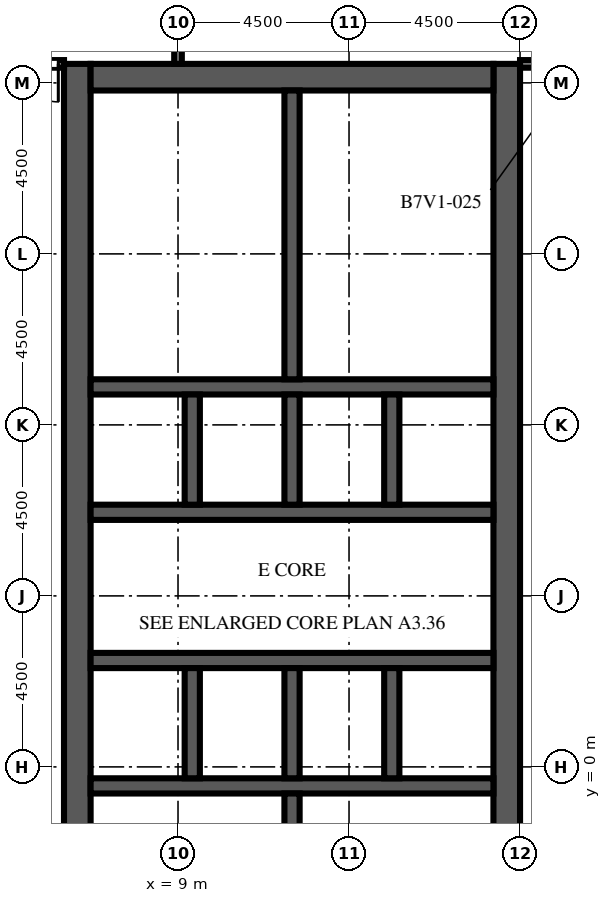
"""IFC4 building model, lengths in metres.
Left out: names, types, materials, properties, quantities, classifications, styles, units other than length and angle.
Written with IfcOpenShell. Run it as: python <this file> out.ifc"""

import sys

from ifc_helpers import new_model, si_unit, direction, frame, frame_2d, origin, place, context, subcontext, project, spatial, rectangle, extrude, element, fill, save


model = new_model("IFC4")
c1 = context("Model", 3, precision=1e-05, world=origin(), true_north=direction((0.0, 1.0)))
c2 = subcontext(c1, "Body", "Model", "MODEL_VIEW")
j1 = project(units=[si_unit("LENGTHUNIT", "METRE"), si_unit("PLANEANGLEUNIT", "RADIAN")], contexts=[c1])
p1 = place(None, origin())
s1 = spatial("IfcSite", under=j1, at=p1, CompositionType="ELEMENT")
p2 = place(p1, origin())
s2 = spatial("IfcBuilding", under=s1, at=p2, CompositionType="ELEMENT")
p3 = place(p2, frame((0.0, 0.0, 243.9)))
s3 = spatial("IfcBuildingStorey", under=s2, at=p3, CompositionType="ELEMENT", Elevation=243.9)
p4 = place(p3, frame((6.35, -9.0, 0.0), z_axis=(0.0, 0.0, 1.0), x_axis=(0.0, 1.0, 0.0)))
e1 = element("IfcWall", 1, at=p4, inside=s3, PredefinedType="SHEAR", context=c2, shape_type="SweptSolid", body=[
    extrude(rectangle(XDim=27.5, YDim=0.7, at=frame_2d((13.75, 0.0))), origin(), (0.0, 0.0, 1.0), 4.1),
])
p5 = place(p4, frame((12.55, 0.0, 0.0)))
e2 = element("IfcOpeningElement", 2, at=p5, cuts=e1, PredefinedType="OPENING", context=c2, shape_type="SweptSolid", body=[
    extrude(rectangle(XDim=2.4, YDim=2.4, at=frame_2d((1.2, 1.2))), frame((0.0, 0.36, 0.0), z_axis=(0.0, -1.0, 0.0), x_axis=(1.0, 0.0, 0.0)), (0.0, 0.0, 1.0), 0.72),
])
p6 = place(p4, frame((3.9, 0.0, 0.0)))
e3 = element("IfcOpeningElement", 3, at=p6, cuts=e1, PredefinedType="OPENING", context=c2, shape_type="SweptSolid", body=[
    extrude(rectangle(XDim=1.2, YDim=2.1, at=frame_2d((0.6, 1.05))), frame((0.0, 0.36, 0.0), z_axis=(0.0, -1.0, 0.0), x_axis=(1.0, 0.0, 0.0)), (0.0, 0.0, 1.0), 0.72),
])
p7 = place(p4, frame((22.4, 0.0, 0.0)))
e4 = element("IfcOpeningElement", 4, at=p7, cuts=e1, PredefinedType="OPENING", context=c2, shape_type="SweptSolid", body=[
    extrude(rectangle(XDim=1.2, YDim=2.1, at=frame_2d((0.6, 1.05))), frame((0.0, 0.36, 0.0), z_axis=(0.0, -1.0, 0.0), x_axis=(1.0, 0.0, 0.0)), (0.0, 0.0, 1.0), 0.72),
])
p8 = place(p3, frame((17.65, -9.0, 0.0), z_axis=(0.0, 0.0, 1.0), x_axis=(0.0, 1.0, 0.0)))
e5 = element("IfcWall", 5, at=p8, inside=s3, PredefinedType="SHEAR", context=c2, shape_type="SweptSolid", body=[
    extrude(rectangle(XDim=27.5, YDim=0.7, at=frame_2d((13.75, 0.0))), origin(), (0.0, 0.0, 1.0), 4.1),
])
p9 = place(p8, frame((12.55, 0.0, 0.0)))
e6 = element("IfcOpeningElement", 6, at=p9, cuts=e5, PredefinedType="OPENING", context=c2, shape_type="SweptSolid", body=[
    extrude(rectangle(XDim=2.4, YDim=2.4, at=frame_2d((1.2, 1.2))), frame((0.0, 0.36, 0.0), z_axis=(0.0, -1.0, 0.0), x_axis=(1.0, 0.0, 0.0)), (0.0, 0.0, 1.0), 0.72),
])
p10 = place(p8, frame((6.825, 0.0, 0.0)))
e7 = element("IfcOpeningElement", 7, at=p10, cuts=e5, PredefinedType="OPENING", context=c2, shape_type="SweptSolid", body=[
    extrude(rectangle(XDim=1.2, YDim=2.1, at=frame_2d((0.6, 1.05))), frame((0.0, 0.36, 0.0), z_axis=(0.0, -1.0, 0.0), x_axis=(1.0, 0.0, 0.0)), (0.0, 0.0, 1.0), 0.72),
])
p11 = place(p8, frame((19.475, 0.0, 0.0)))
e8 = element("IfcOpeningElement", 8, at=p11, cuts=e5, PredefinedType="OPENING", context=c2, shape_type="SweptSolid", body=[
    extrude(rectangle(XDim=1.2, YDim=2.1, at=frame_2d((0.6, 1.05))), frame((0.0, 0.36, 0.0), z_axis=(0.0, -1.0, 0.0), x_axis=(1.0, 0.0, 0.0)), (0.0, 0.0, 1.0), 0.72),
])
p12 = place(p3, frame((6.7, 18.15, 0.0), z_axis=(0.0, 0.0, 1.0), x_axis=(1.0, 0.0, 0.0)))
e9 = element("IfcWall", 9, at=p12, inside=s3, PredefinedType="SHEAR", context=c2, shape_type="SweptSolid", body=[
    extrude(rectangle(XDim=10.6, YDim=0.7, at=frame_2d((5.3, 0.0))), origin(), (0.0, 0.0, 1.0), 4.1),
])
p13 = place(p3, frame((6.7, -0.5, 0.0), z_axis=(0.0, 0.0, 1.0), x_axis=(1.0, 0.0, 0.0)))
e10 = element("IfcWall", 10, at=p13, inside=s3, PredefinedType="SHEAR", context=c2, shape_type="SweptSolid", body=[
    extrude(rectangle(XDim=10.6, YDim=0.4, at=frame_2d((5.3, 0.0))), origin(), (0.0, 0.0, 1.0), 4.1),
])
p14 = place(p3, frame((6.7, 2.8, 0.0), z_axis=(0.0, 0.0, 1.0), x_axis=(1.0, 0.0, 0.0)))
e11 = element("IfcWall", 11, at=p14, inside=s3, PredefinedType="SHEAR", context=c2, shape_type="SweptSolid", body=[
    extrude(rectangle(XDim=10.6, YDim=0.4, at=frame_2d((5.3, 0.0))), origin(), (0.0, 0.0, 1.0), 4.1),
])
p15 = place(p14, frame((0.688, 0.0, 0.0)))
e12 = element("IfcOpeningElement", 12, at=p15, cuts=e11, PredefinedType="OPENING", context=c2, shape_type="SweptSolid", body=[
    extrude(rectangle(XDim=1.1, YDim=2.1, at=frame_2d((0.55, 1.05))), frame((0.0, 0.21, 0.0), z_axis=(0.0, -1.0, 0.0), x_axis=(1.0, 0.0, 0.0)), (0.0, 0.0, 1.0), 0.42),
])
p16 = place(p14, frame((3.438, 0.0, 0.0)))
e13 = element("IfcOpeningElement", 13, at=p16, cuts=e11, PredefinedType="OPENING", context=c2, shape_type="SweptSolid", body=[
    extrude(rectangle(XDim=1.1, YDim=2.1, at=frame_2d((0.55, 1.05))), frame((0.0, 0.21, 0.0), z_axis=(0.0, -1.0, 0.0), x_axis=(1.0, 0.0, 0.0)), (0.0, 0.0, 1.0), 0.42),
])
p17 = place(p14, frame((6.113, 0.0, 0.0)))
e14 = element("IfcOpeningElement", 14, at=p17, cuts=e11, PredefinedType="OPENING", context=c2, shape_type="SweptSolid", body=[
    extrude(rectangle(XDim=1.0, YDim=2.1, at=frame_2d((0.5, 1.05))), frame((0.0, 0.21, 0.0), z_axis=(0.0, -1.0, 0.0), x_axis=(1.0, 0.0, 0.0)), (0.0, 0.0, 1.0), 0.42),
])
p18 = place(p14, frame((8.863, 0.0, 0.0)))
e15 = element("IfcOpeningElement", 15, at=p18, cuts=e11, PredefinedType="OPENING", context=c2, shape_type="SweptSolid", body=[
    extrude(rectangle(XDim=1.0, YDim=2.1, at=frame_2d((0.5, 1.05))), frame((0.0, 0.21, 0.0), z_axis=(0.0, -1.0, 0.0), x_axis=(1.0, 0.0, 0.0)), (0.0, 0.0, 1.0), 0.42),
])
p19 = place(p3, frame((6.7, 6.7, 0.0), z_axis=(0.0, 0.0, 1.0), x_axis=(1.0, 0.0, 0.0)))
e16 = element("IfcWall", 16, at=p19, inside=s3, PredefinedType="SHEAR", context=c2, shape_type="SweptSolid", body=[
    extrude(rectangle(XDim=10.6, YDim=0.4, at=frame_2d((5.3, 0.0))), origin(), (0.0, 0.0, 1.0), 4.1),
])
p20 = place(p19, frame((3.438, 0.0, 0.0)))
e17 = element("IfcOpeningElement", 17, at=p20, cuts=e16, PredefinedType="OPENING", context=c2, shape_type="SweptSolid", body=[
    extrude(rectangle(XDim=1.1, YDim=2.1, at=frame_2d((0.55, 1.05))), frame((0.0, 0.21, 0.0), z_axis=(0.0, -1.0, 0.0), x_axis=(1.0, 0.0, 0.0)), (0.0, 0.0, 1.0), 0.42),
])
p21 = place(p19, frame((6.062, 0.0, 0.0)))
e18 = element("IfcOpeningElement", 18, at=p21, cuts=e16, PredefinedType="OPENING", context=c2, shape_type="SweptSolid", body=[
    extrude(rectangle(XDim=1.1, YDim=2.1, at=frame_2d((0.55, 1.05))), frame((0.0, 0.21, 0.0), z_axis=(0.0, -1.0, 0.0), x_axis=(1.0, 0.0, 0.0)), (0.0, 0.0, 1.0), 0.42),
])
p22 = place(p19, frame((8.812, 0.0, 0.0)))
e19 = element("IfcOpeningElement", 19, at=p22, cuts=e16, PredefinedType="OPENING", context=c2, shape_type="SweptSolid", body=[
    extrude(rectangle(XDim=1.1, YDim=2.1, at=frame_2d((0.55, 1.05))), frame((0.0, 0.21, 0.0), z_axis=(0.0, -1.0, 0.0), x_axis=(1.0, 0.0, 0.0)), (0.0, 0.0, 1.0), 0.42),
])
p23 = place(p19, frame((0.738, 0.0, 0.0)))
e20 = element("IfcOpeningElement", 20, at=p23, cuts=e16, PredefinedType="OPENING", context=c2, shape_type="SweptSolid", body=[
    extrude(rectangle(XDim=1.0, YDim=2.1, at=frame_2d((0.5, 1.05))), frame((0.0, 0.21, 0.0), z_axis=(0.0, -1.0, 0.0), x_axis=(1.0, 0.0, 0.0)), (0.0, 0.0, 1.0), 0.42),
])
p24 = place(p3, frame((6.7, 10.0, 0.0), z_axis=(0.0, 0.0, 1.0), x_axis=(1.0, 0.0, 0.0)))
e21 = element("IfcWall", 21, at=p24, inside=s3, PredefinedType="SHEAR", context=c2, shape_type="SweptSolid", body=[
    extrude(rectangle(XDim=10.6, YDim=0.4, at=frame_2d((5.3, 0.0))), origin(), (0.0, 0.0, 1.0), 4.1),
])
for number, where, z_axis, x_axis in (
    (22, (9.375, -0.3, 0.0), (0.0, 0.0, 1.0), (0.0, 1.0, 0.0)),
    (23, (9.375, 6.9, 0.0), (0.0, 0.0, 1.0), (0.0, 1.0, 0.0)),
    (24, (12.0, -0.3, 0.0), (0.0, 0.0, 1.0), (0.0, 1.0, 0.0)),
    (25, (12.0, 6.9, 0.0), (0.0, 0.0, 1.0), (0.0, 1.0, 0.0)),
    (26, (14.625, -0.3, 0.0), (0.0, 0.0, 1.0), (0.0, 1.0, 0.0)),
    (27, (14.625, 6.9, 0.0), (0.0, 0.0, 1.0), (0.0, 1.0, 0.0)),
):
    element("IfcWall", number, at=place(p3, frame(where, z_axis=z_axis, x_axis=x_axis)), inside=s3, PredefinedType="SHEAR", context=c2, shape_type="SweptSolid", body=[
        extrude(rectangle(XDim=2.9, YDim=0.4, at=frame_2d((1.45, 0.0))), origin(), (0.0, 0.0, 1.0), 4.1),
    ])
for number, where, z_axis, x_axis in (
    (28, (12.0, -8.3, 0.0), (0.0, 0.0, 1.0), (0.0, 1.0, 0.0)),
    (29, (12.0, 10.2, 0.0), (0.0, 0.0, 1.0), (0.0, 1.0, 0.0)),
):
    element("IfcWall", number, at=place(p3, frame(where, z_axis=z_axis, x_axis=x_axis)), inside=s3, PredefinedType="SHEAR", context=c2, shape_type="SweptSolid", body=[
        extrude(rectangle(XDim=7.6, YDim=0.4, at=frame_2d((3.8, 0.0))), origin(), (0.0, 0.0, 1.0), 4.1),
    ])
p25 = place(p3, frame((8.2, -3.588, 0.0), z_axis=(0.0, 0.0, 1.0), x_axis=(0.0, 1.0, 0.0)))
e30 = element("IfcWall", 30, at=p25, inside=s3, PredefinedType="PARTITIONING", context=c2, shape_type="SweptSolid", body=[
    extrude(rectangle(XDim=2.888, YDim=0.1, at=frame_2d((1.444, 0.0))), origin(), (0.0, 0.0, 1.0), 3.65),
])
p26 = place(p25, frame((0.944, 0.0, 0.0)))
e31 = element("IfcOpeningElement", 31, at=p26, cuts=e30, PredefinedType="OPENING", context=c2, shape_type="SweptSolid", body=[
    extrude(rectangle(XDim=1.0, YDim=2.1, at=frame_2d((0.5, 1.05))), frame((0.0, 0.06, 0.0), z_axis=(0.0, -1.0, 0.0), x_axis=(1.0, 0.0, 0.0)), (0.0, 0.0, 1.0), 0.12),
])
p27 = place(p3, frame((8.1, 10.2, 0.0), z_axis=(0.0, 0.0, 1.0), x_axis=(0.0, 1.0, 0.0)))
e32 = element("IfcWall", 32, at=p27, inside=s3, PredefinedType="PARTITIONING", context=c2, shape_type="SweptSolid", body=[
    extrude(rectangle(XDim=2.28, YDim=0.1, at=frame_2d((1.14, 0.0))), origin(), (0.0, 0.0, 1.0), 3.65),
])
p28 = place(p27, frame((0.64, 0.0, 0.0)))
e33 = element("IfcOpeningElement", 33, at=p28, cuts=e32, PredefinedType="OPENING", context=c2, shape_type="SweptSolid", body=[
    extrude(rectangle(XDim=1.0, YDim=2.1, at=frame_2d((0.5, 1.05))), frame((0.0, 0.06, 0.0), z_axis=(0.0, -1.0, 0.0), x_axis=(1.0, 0.0, 0.0)), (0.0, 0.0, 1.0), 0.12),
])
p29 = place(p3, frame((8.1, 12.48, 0.0), z_axis=(0.0, 0.0, 1.0), x_axis=(0.0, 1.0, 0.0)))
e34 = element("IfcWall", 34, at=p29, inside=s3, PredefinedType="PARTITIONING", context=c2, shape_type="SweptSolid", body=[
    extrude(rectangle(XDim=2.432, YDim=0.1, at=frame_2d((1.216, 0.0))), origin(), (0.0, 0.0, 1.0), 3.65),
])
p30 = place(p29, frame((0.716, 0.0, 0.0)))
e35 = element("IfcOpeningElement", 35, at=p30, cuts=e34, PredefinedType="OPENING", context=c2, shape_type="SweptSolid", body=[
    extrude(rectangle(XDim=1.0, YDim=2.1, at=frame_2d((0.5, 1.05))), frame((0.0, 0.06, 0.0), z_axis=(0.0, -1.0, 0.0), x_axis=(1.0, 0.0, 0.0)), (0.0, 0.0, 1.0), 0.12),
])
p31 = place(p3, frame((8.1, 14.912, 0.0), z_axis=(0.0, 0.0, 1.0), x_axis=(0.0, 1.0, 0.0)))
e36 = element("IfcWall", 36, at=p31, inside=s3, PredefinedType="PARTITIONING", context=c2, shape_type="SweptSolid", body=[
    extrude(rectangle(XDim=2.888, YDim=0.1, at=frame_2d((1.444, 0.0))), origin(), (0.0, 0.0, 1.0), 3.65),
])
p32 = place(p31, frame((0.944, 0.0, 0.0)))
e37 = element("IfcOpeningElement", 37, at=p32, cuts=e36, PredefinedType="OPENING", context=c2, shape_type="SweptSolid", body=[
    extrude(rectangle(XDim=1.0, YDim=2.1, at=frame_2d((0.5, 1.05))), frame((0.0, 0.06, 0.0), z_axis=(0.0, -1.0, 0.0), x_axis=(1.0, 0.0, 0.0)), (0.0, 0.0, 1.0), 0.12),
])
for number, where, z_axis, x_axis in (
    (38, (8.1, 12.48, 0.0), (0.0, 0.0, 1.0), (1.0, 0.0, 0.0)),
    (39, (8.1, 14.912, 0.0), (0.0, 0.0, 1.0), (1.0, 0.0, 0.0)),
):
    element("IfcWall", number, at=place(p3, frame(where, z_axis=z_axis, x_axis=x_axis)), inside=s3, PredefinedType="PARTITIONING", context=c2, shape_type="SweptSolid", body=[
        extrude(rectangle(XDim=3.7, YDim=0.1, at=frame_2d((1.85, 0.0))), origin(), (0.0, 0.0, 1.0), 3.65),
    ])
p33 = place(p3, frame((9.0, 18.5, 0.0), z_axis=(0.0, 0.0, 1.0), x_axis=(0.0, 1.0, 0.0)))
e40 = element("IfcWall", 40, at=p33, inside=s3, PredefinedType="PARTITIONING", context=c2, shape_type="SweptSolid", body=[
    extrude(rectangle(XDim=3.5, YDim=0.2, at=frame_2d((1.75, 0.0))), origin(), (0.0, 0.0, 1.0), 3.65),
])
p34 = place(p3, frame((1.5, 18.5, 0.0), z_axis=(0.0, 0.0, 1.0), x_axis=(1.0, 0.0, 0.0)))
e41 = element("IfcWall", 41, at=p34, inside=s3, PredefinedType="PARTITIONING", context=c2, shape_type="SweptSolid", body=[
    extrude(rectangle(XDim=4.5, YDim=0.2, at=frame_2d((2.25, 0.0))), origin(), (0.0, 0.0, 1.0), 3.65),
])
p35 = place(p34, frame((1.6, 0.0, 0.0)))
e42 = element("IfcOpeningElement", 42, at=p35, cuts=e41, PredefinedType="OPENING", context=c2, shape_type="SweptSolid", body=[
    extrude(rectangle(XDim=1.0, YDim=2.1, at=frame_2d((0.5, 1.05))), frame((0.0, 0.11, 0.0), z_axis=(0.0, -1.0, 0.0), x_axis=(1.0, 0.0, 0.0)), (0.0, 0.0, 1.0), 0.22),
])
p36 = place(p34, frame((3.35, 0.0, 0.0)))
e43 = element("IfcOpeningElement", 43, at=p36, cuts=e41, PredefinedType="OPENING", context=c2, shape_type="SweptSolid", body=[
    extrude(rectangle(XDim=1.0, YDim=2.1, at=frame_2d((0.5, 1.05))), frame((0.0, 0.11, 0.0), z_axis=(0.0, -1.0, 0.0), x_axis=(1.0, 0.0, 0.0)), (0.0, 0.0, 1.0), 0.22),
])
p37 = place(p3, frame((18.0, 18.5, 0.0), z_axis=(0.0, 0.0, 1.0), x_axis=(1.0, 0.0, 0.0)))
e44 = element("IfcWall", 44, at=p37, inside=s3, PredefinedType="PARTITIONING", context=c2, shape_type="SweptSolid", body=[
    extrude(rectangle(XDim=3.0, YDim=0.2, at=frame_2d((1.5, 0.0))), origin(), (0.0, 0.0, 1.0), 3.65),
])
p38 = place(p37, frame((1.1, 0.0, 0.0)))
e45 = element("IfcOpeningElement", 45, at=p38, cuts=e44, PredefinedType="OPENING", context=c2, shape_type="SweptSolid", body=[
    extrude(rectangle(XDim=1.0, YDim=2.1, at=frame_2d((0.5, 1.05))), frame((0.0, 0.11, 0.0), z_axis=(0.0, -1.0, 0.0), x_axis=(1.0, 0.0, 0.0)), (0.0, 0.0, 1.0), 0.22),
])
p39 = place(p15, origin())
e46 = element("IfcDoor", 46, at=p39, inside=s3, OperationType="DOUBLE_DOOR_SLIDING", PredefinedType="DOOR", context=c2, shape_type="SweptSolid", body=[
    extrude(rectangle(XDim=1.1, YDim=2.1, at=frame_2d((0.55, 1.05))), frame((0.0, 0.025, 0.0), z_axis=(0.0, -1.0, 0.0), x_axis=(1.0, 0.0, 0.0)), (0.0, 0.0, 1.0), 0.05),
])
fill(e12, e46)
p40 = place(p16, origin())
e47 = element("IfcDoor", 47, at=p40, inside=s3, OperationType="DOUBLE_DOOR_SLIDING", PredefinedType="DOOR", context=c2, shape_type="SweptSolid", body=[
    extrude(rectangle(XDim=1.1, YDim=2.1, at=frame_2d((0.55, 1.05))), frame((0.0, 0.025, 0.0), z_axis=(0.0, -1.0, 0.0), x_axis=(1.0, 0.0, 0.0)), (0.0, 0.0, 1.0), 0.05),
])
fill(e13, e47)
p41 = place(p20, origin())
e48 = element("IfcDoor", 48, at=p41, inside=s3, OperationType="DOUBLE_DOOR_SLIDING", PredefinedType="DOOR", context=c2, shape_type="SweptSolid", body=[
    extrude(rectangle(XDim=1.1, YDim=2.1, at=frame_2d((0.55, 1.05))), frame((0.0, 0.025, 0.0), z_axis=(0.0, -1.0, 0.0), x_axis=(1.0, 0.0, 0.0)), (0.0, 0.0, 1.0), 0.05),
])
fill(e17, e48)
p42 = place(p21, origin())
e49 = element("IfcDoor", 49, at=p42, inside=s3, OperationType="DOUBLE_DOOR_SLIDING", PredefinedType="DOOR", context=c2, shape_type="SweptSolid", body=[
    extrude(rectangle(XDim=1.1, YDim=2.1, at=frame_2d((0.55, 1.05))), frame((0.0, 0.025, 0.0), z_axis=(0.0, -1.0, 0.0), x_axis=(1.0, 0.0, 0.0)), (0.0, 0.0, 1.0), 0.05),
])
fill(e18, e49)
p43 = place(p22, origin())
e50 = element("IfcDoor", 50, at=p43, inside=s3, OperationType="DOUBLE_DOOR_SLIDING", PredefinedType="DOOR", context=c2, shape_type="SweptSolid", body=[
    extrude(rectangle(XDim=1.1, YDim=2.1, at=frame_2d((0.55, 1.05))), frame((0.0, 0.025, 0.0), z_axis=(0.0, -1.0, 0.0), x_axis=(1.0, 0.0, 0.0)), (0.0, 0.0, 1.0), 0.05),
])
fill(e19, e50)
p44 = place(p5, origin())
e51 = element("IfcDoor", 51, at=p44, inside=s3, OperationType="DOUBLE_DOOR_DOUBLE_SWING", PredefinedType="DOOR", context=c2, shape_type="SweptSolid", body=[
    extrude(rectangle(XDim=2.4, YDim=2.4, at=frame_2d((1.2, 1.2))), frame((0.0, 0.025, 0.0), z_axis=(0.0, -1.0, 0.0), x_axis=(1.0, 0.0, 0.0)), (0.0, 0.0, 1.0), 0.05),
])
fill(e2, e51)
p45 = place(p9, origin())
e52 = element("IfcDoor", 52, at=p45, inside=s3, OperationType="DOUBLE_DOOR_DOUBLE_SWING", PredefinedType="DOOR", context=c2, shape_type="SweptSolid", body=[
    extrude(rectangle(XDim=2.4, YDim=2.4, at=frame_2d((1.2, 1.2))), frame((0.0, 0.025, 0.0), z_axis=(0.0, -1.0, 0.0), x_axis=(1.0, 0.0, 0.0)), (0.0, 0.0, 1.0), 0.05),
])
fill(e6, e52)
p46 = place(p10, frame((1.2, 0.0, 0.0), z_axis=(0.0, 0.0, 1.0), x_axis=(-1.0, 0.0, 0.0)))
e53 = element("IfcDoor", 53, at=p46, inside=s3, OperationType="SINGLE_SWING_LEFT", PredefinedType="DOOR", context=c2, shape_type="SweptSolid", body=[
    extrude(rectangle(XDim=1.2, YDim=2.1, at=frame_2d((0.6, 1.05))), frame((0.0, 0.025, 0.0), z_axis=(0.0, -1.0, 0.0), x_axis=(1.0, 0.0, 0.0)), (0.0, 0.0, 1.0), 0.05),
])
fill(e7, e53)
p47 = place(p11, frame((1.2, 0.0, 0.0), z_axis=(0.0, 0.0, 1.0), x_axis=(-1.0, 0.0, 0.0)))
e54 = element("IfcDoor", 54, at=p47, inside=s3, OperationType="SINGLE_SWING_LEFT", PredefinedType="DOOR", context=c2, shape_type="SweptSolid", body=[
    extrude(rectangle(XDim=1.2, YDim=2.1, at=frame_2d((0.6, 1.05))), frame((0.0, 0.025, 0.0), z_axis=(0.0, -1.0, 0.0), x_axis=(1.0, 0.0, 0.0)), (0.0, 0.0, 1.0), 0.05),
])
fill(e8, e54)
p48 = place(p17, origin())
e55 = element("IfcDoor", 55, at=p48, inside=s3, OperationType="SINGLE_SWING_LEFT", PredefinedType="DOOR", context=c2, shape_type="SweptSolid", body=[
    extrude(rectangle(XDim=1.0, YDim=2.1, at=frame_2d((0.5, 1.05))), frame((0.0, 0.025, 0.0), z_axis=(0.0, -1.0, 0.0), x_axis=(1.0, 0.0, 0.0)), (0.0, 0.0, 1.0), 0.05),
])
fill(e14, e55)
p49 = place(p18, origin())
e56 = element("IfcDoor", 56, at=p49, inside=s3, OperationType="SINGLE_SWING_RIGHT", PredefinedType="DOOR", context=c2, shape_type="SweptSolid", body=[
    extrude(rectangle(XDim=1.0, YDim=2.1, at=frame_2d((0.5, 1.05))), frame((0.0, 0.025, 0.0), z_axis=(0.0, -1.0, 0.0), x_axis=(1.0, 0.0, 0.0)), (0.0, 0.0, 1.0), 0.05),
])
fill(e15, e56)
p50 = place(p23, origin())
e57 = element("IfcDoor", 57, at=p50, inside=s3, OperationType="SINGLE_SWING_LEFT", PredefinedType="DOOR", context=c2, shape_type="SweptSolid", body=[
    extrude(rectangle(XDim=1.0, YDim=2.1, at=frame_2d((0.5, 1.05))), frame((0.0, 0.025, 0.0), z_axis=(0.0, -1.0, 0.0), x_axis=(1.0, 0.0, 0.0)), (0.0, 0.0, 1.0), 0.05),
])
fill(e20, e57)
p51 = place(p7, origin())
e58 = element("IfcDoor", 58, at=p51, inside=s3, OperationType="SINGLE_SWING_RIGHT", PredefinedType="DOOR", context=c2, shape_type="SweptSolid", body=[
    extrude(rectangle(XDim=1.2, YDim=2.1, at=frame_2d((0.6, 1.05))), frame((0.0, -0.275, 0.0), z_axis=(0.0, -1.0, 0.0), x_axis=(1.0, 0.0, 0.0)), (0.0, 0.0, 1.0), 0.05),
])
fill(e4, e58)
p52 = place(p28, origin())
e59 = element("IfcDoor", 59, at=p52, inside=s3, OperationType="SINGLE_SWING_LEFT", PredefinedType="DOOR", context=c2, shape_type="SweptSolid", body=[
    extrude(rectangle(XDim=1.0, YDim=2.1, at=frame_2d((0.5, 1.05))), frame((0.0, 0.025, 0.0), z_axis=(0.0, -1.0, 0.0), x_axis=(1.0, 0.0, 0.0)), (0.0, 0.0, 1.0), 0.05),
])
fill(e33, e59)
p53 = place(p30, origin())
e60 = element("IfcDoor", 60, at=p53, inside=s3, OperationType="SINGLE_SWING_RIGHT", PredefinedType="DOOR", context=c2, shape_type="SweptSolid", body=[
    extrude(rectangle(XDim=1.0, YDim=2.1, at=frame_2d((0.5, 1.05))), frame((0.0, 0.025, 0.0), z_axis=(0.0, -1.0, 0.0), x_axis=(1.0, 0.0, 0.0)), (0.0, 0.0, 1.0), 0.05),
])
fill(e35, e60)
p54 = place(p32, origin())
e61 = element("IfcDoor", 61, at=p54, inside=s3, OperationType="SINGLE_SWING_LEFT", PredefinedType="DOOR", context=c2, shape_type="SweptSolid", body=[
    extrude(rectangle(XDim=1.0, YDim=2.1, at=frame_2d((0.5, 1.05))), frame((0.0, 0.025, 0.0), z_axis=(0.0, -1.0, 0.0), x_axis=(1.0, 0.0, 0.0)), (0.0, 0.0, 1.0), 0.05),
])
fill(e37, e61)
p55 = place(p36, origin())
e62 = element("IfcDoor", 62, at=p55, inside=s3, OperationType="SINGLE_SWING_RIGHT", PredefinedType="DOOR", context=c2, shape_type="SweptSolid", body=[
    extrude(rectangle(XDim=1.0, YDim=2.1, at=frame_2d((0.5, 1.05))), frame((0.0, 0.025, 0.0), z_axis=(0.0, -1.0, 0.0), x_axis=(1.0, 0.0, 0.0)), (0.0, 0.0, 1.0), 0.05),
])
fill(e43, e62)
save(model, sys.argv[1])
